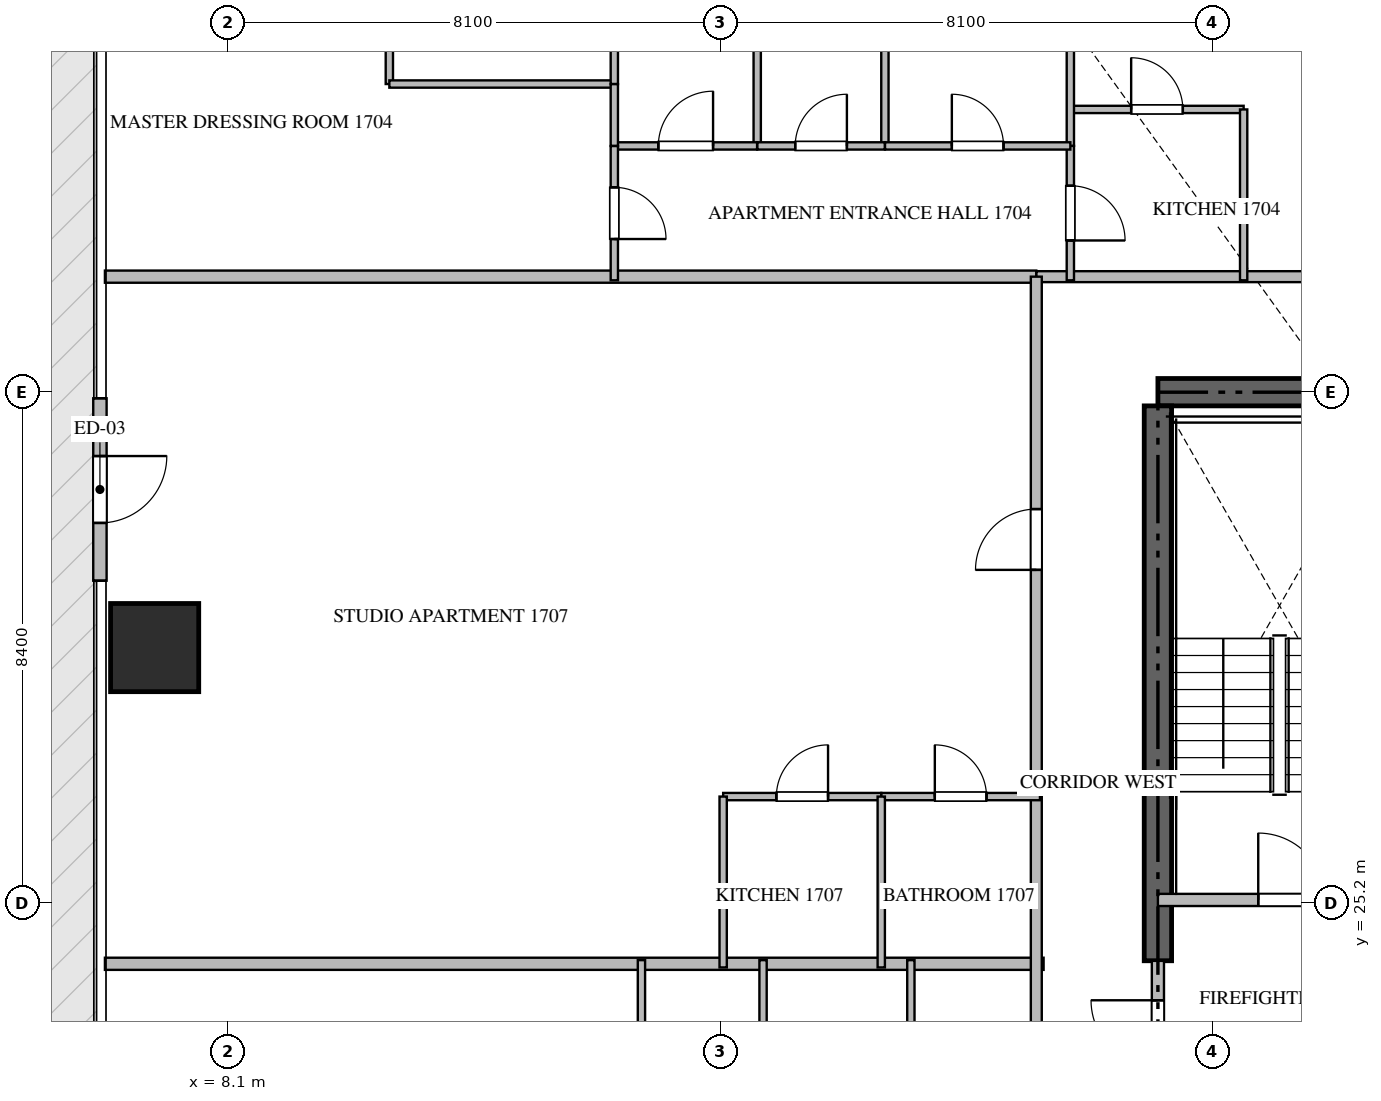
"""IFC4 building model, lengths in metres.
Left out: names, types, materials, properties, quantities, classifications, styles, units other than length and angle.
Written with IfcOpenShell. Run it as: python <this file> out.ifc"""

import sys

from ifc_helpers import new_model, si_unit, direction, frame, frame_2d, origin, origin_2d, place, context, subcontext, project, spatial, rectangle, extrude, source, transform, mapped, element, fill, save


model = new_model("IFC4")
c1 = context("Model", 3, precision=1e-05, world=origin(), true_north=direction((0.0, 1.0)))
c2 = subcontext(c1, "Body", "Model", "MODEL_VIEW")
j1 = project(units=[si_unit("LENGTHUNIT", "METRE"), si_unit("PLANEANGLEUNIT", "RADIAN")], contexts=[c1])
p1 = place(None, origin())
s1 = spatial("IfcSite", under=j1, at=p1, CompositionType="ELEMENT")
p2 = place(p1, origin())
s2 = spatial("IfcBuilding", under=s1, at=p2, CompositionType="ELEMENT")
p3 = place(p2, frame((0.0, 0.0, 71.7)))
s3 = spatial("IfcBuildingStorey", under=s2, at=p3, CompositionType="ELEMENT", Elevation=71.7)
p4 = place(p3, frame((41.4, 33.6, -0.26), z_axis=(0.0, 0.0, 1.0), x_axis=(-1.0, 0.0, 0.0)))
e1 = element("IfcWall", 1, at=p4, inside=s3, PredefinedType="SHEAR", context=c2, shape_type="SweptSolid", body=[
    extrude(rectangle(XDim=18.0, YDim=0.45, at=frame_2d((9.0, 0.0))), origin(), (0.0, 0.0, 1.0), 3.748),
])
p5 = place(p3, frame((23.4, 24.25, -0.26), z_axis=(0.0, 0.0, 1.0), x_axis=(0.0, 1.0, 0.0)))
e2 = element("IfcWall", 2, at=p5, inside=s3, PredefinedType="SHEAR", context=c2, shape_type="SweptSolid", body=[
    extrude(rectangle(XDim=9.125, YDim=0.45, at=frame_2d((4.562, 0.0))), origin(), (0.0, 0.0, 1.0), 3.748),
])
m1 = source(origin(), c2, "Body", "SweptSolid", [
    extrude(rectangle(XDim=1.45, YDim=1.45, at=origin_2d()), origin(), (0.0, 0.0, 1.0), 3.75),
])
p6 = place(p3, frame((6.9, 29.4, -0.26), z_axis=(0.0, 0.0, 1.0), x_axis=(1.0, 0.0, 0.0)))
e3 = element("IfcColumn", 3, at=p6, inside=s3, PredefinedType="COLUMN", context=c2, shape_type="MappedRepresentation", body=[
    mapped(m1, transform((0.0, 0.0, 0.0), scale=1.0)),
])
p7 = place(p3, frame((6.0, 33.5, 0.0), z_axis=(0.0, 0.0, 1.0), x_axis=(0.0, -1.0, 0.0)))
e4 = element("IfcWall", 4, at=p7, inside=s3, PredefinedType="ELEMENTEDWALL", context=c2, shape_type="SweptSolid", body=[
    extrude(rectangle(XDim=3.0, YDim=0.22, at=frame_2d((1.5, 0.0))), origin(), (0.0, 0.0, 1.0), 3.475),
])
p8 = place(p7, frame((0.95, 0.0, 0.0)))
e5 = element("IfcOpeningElement", 5, at=p8, cuts=e4, PredefinedType="OPENING", context=c2, shape_type="SweptSolid", body=[
    extrude(rectangle(XDim=1.1, YDim=2.2, at=frame_2d((0.55, 1.1))), frame((0.0, 0.12, 0.0), z_axis=(0.0, -1.0, 0.0), x_axis=(1.0, 0.0, 0.0)), (0.0, 0.0, 1.0), 0.24),
])
p9 = place(p3, frame((23.4, 25.25, 0.0), z_axis=(0.0, 0.0, 1.0), x_axis=(1.0, 0.0, 0.0)))
e6 = element("IfcWall", 6, at=p9, inside=s3, PredefinedType="STANDARD", context=c2, shape_type="SweptSolid", body=[
    extrude(rectangle(XDim=4.45, YDim=0.2, at=frame_2d((2.225, 0.0))), origin(), (0.0, 0.0, 1.0), 3.49),
])
p10 = place(p9, frame((1.65, 0.0, 0.0)))
e7 = element("IfcOpeningElement", 7, at=p10, cuts=e6, PredefinedType="OPENING", context=c2, shape_type="SweptSolid", body=[
    extrude(rectangle(XDim=1.1, YDim=2.15, at=frame_2d((0.55, 1.075))), frame((0.0, 0.11, 0.0), z_axis=(0.0, -1.0, 0.0), x_axis=(1.0, 0.0, 0.0)), (0.0, 0.0, 1.0), 0.22),
])
p11 = place(p3, frame((23.4, 21.852, 0.0), z_axis=(0.0, 0.0, 1.0), x_axis=(0.0, 1.0, 0.0)))
e8 = element("IfcWall", 8, at=p11, inside=s3, PredefinedType="STANDARD", context=c2, shape_type="SweptSolid", body=[
    extrude(rectangle(XDim=2.396, YDim=0.2, at=frame_2d((1.198, 0.0))), origin(), (0.0, 0.0, 1.0), 3.49),
])
p12 = place(p11, frame((0.648, 0.0, 0.0)))
e9 = element("IfcOpeningElement", 9, at=p12, cuts=e8, PredefinedType="OPENING", context=c2, shape_type="SweptSolid", body=[
    extrude(rectangle(XDim=1.1, YDim=2.15, at=frame_2d((0.55, 1.075))), frame((0.0, 0.11, 0.0), z_axis=(0.0, -1.0, 0.0), x_axis=(1.0, 0.0, 0.0)), (0.0, 0.0, 1.0), 0.22),
])
p13 = place(p3, frame((6.082, 24.2, 0.0), z_axis=(0.0, 0.0, 1.0), x_axis=(1.0, 0.0, 0.0)))
e10 = element("IfcWall", 10, at=p13, inside=s3, PredefinedType="PARTITIONING", context=c2, shape_type="SweptSolid", body=[
    extrude(rectangle(XDim=15.438, YDim=0.2, at=frame_2d((7.719, 0.0))), origin(), (0.0, 0.0, 1.0), 3.49),
])
p14 = place(p3, frame((6.082, 35.5, 0.0), z_axis=(0.0, 0.0, 1.0), x_axis=(1.0, 0.0, 0.0)))
e11 = element("IfcWall", 11, at=p14, inside=s3, PredefinedType="PARTITIONING", context=c2, shape_type="SweptSolid", body=[
    extrude(rectangle(XDim=15.318, YDim=0.2, at=frame_2d((7.659, 0.0))), origin(), (0.0, 0.0, 1.0), 3.49),
])
p15 = place(p3, frame((21.402, 35.5, 0.0), z_axis=(0.0, 0.0, 1.0), x_axis=(1.0, 0.0, 0.0)))
e12 = element("IfcWall", 12, at=p15, inside=s3, PredefinedType="PARTITIONING", context=c2, shape_type="SweptSolid", body=[
    extrude(rectangle(XDim=21.996, YDim=0.18, at=frame_2d((10.998, 0.0))), origin(), (0.0, 0.0, 1.0), 3.49),
])
p16 = place(p15, frame((5.774, 0.0, 0.0)))
e13 = element("IfcOpeningElement", 13, at=p16, cuts=e12, PredefinedType="OPENING", context=c2, shape_type="SweptSolid", body=[
    extrude(rectangle(XDim=1.0, YDim=2.15, at=frame_2d((0.5, 1.075))), frame((0.0, 0.1, 0.0), z_axis=(0.0, -1.0, 0.0), x_axis=(1.0, 0.0, 0.0)), (0.0, 0.0, 1.0), 0.2),
])
p17 = place(p15, frame((16.272, 0.0, 0.0)))
e14 = element("IfcOpeningElement", 14, at=p17, cuts=e12, PredefinedType="OPENING", context=c2, shape_type="SweptSolid", body=[
    extrude(rectangle(XDim=1.0, YDim=2.15, at=frame_2d((0.5, 1.075))), frame((0.0, 0.1, 0.0), z_axis=(0.0, -1.0, 0.0), x_axis=(1.0, 0.0, 0.0)), (0.0, 0.0, 1.0), 0.2),
])
p18 = place(p3, frame((21.4, 14.9, 0.0), z_axis=(0.0, 0.0, 1.0), x_axis=(0.0, 1.0, 0.0)))
e15 = element("IfcWall", 15, at=p18, inside=s3, PredefinedType="PARTITIONING", context=c2, shape_type="SweptSolid", body=[
    extrude(rectangle(XDim=20.6, YDim=0.18, at=frame_2d((10.3, 0.0))), origin(), (0.0, 0.0, 1.0), 3.49),
])
p19 = place(p18, frame((1.96, 0.0, 0.0)))
e16 = element("IfcOpeningElement", 16, at=p19, cuts=e15, PredefinedType="OPENING", context=c2, shape_type="SweptSolid", body=[
    extrude(rectangle(XDim=1.0, YDim=2.15, at=frame_2d((0.5, 1.075))), frame((0.0, 0.1, 0.0), z_axis=(0.0, -1.0, 0.0), x_axis=(1.0, 0.0, 0.0)), (0.0, 0.0, 1.0), 0.2),
])
p20 = place(p18, frame((15.778, 0.0, 0.0)))
e17 = element("IfcOpeningElement", 17, at=p20, cuts=e15, PredefinedType="OPENING", context=c2, shape_type="SweptSolid", body=[
    extrude(rectangle(XDim=1.0, YDim=2.15, at=frame_2d((0.5, 1.075))), frame((0.0, 0.1, 0.0), z_axis=(0.0, -1.0, 0.0), x_axis=(1.0, 0.0, 0.0)), (0.0, 0.0, 1.0), 0.2),
])
p21 = place(p3, frame((21.96, 38.25, 0.0), z_axis=(0.0, 0.0, 1.0), x_axis=(1.0, 0.0, 0.0)))
e18 = element("IfcWall", 18, at=p21, inside=s3, PredefinedType="PARTITIONING", context=c2, shape_type="SweptSolid", body=[
    extrude(rectangle(XDim=2.85, YDim=0.12, at=frame_2d((1.425, 0.0))), origin(), (0.0, 0.0, 1.0), 3.49),
])
p22 = place(p21, frame((1.0, 0.0, 0.0)))
e19 = element("IfcOpeningElement", 19, at=p22, cuts=e18, PredefinedType="OPENING", context=c2, shape_type="SweptSolid", body=[
    extrude(rectangle(XDim=0.85, YDim=2.1, at=frame_2d((0.425, 1.05))), frame((0.0, 0.07, 0.0), z_axis=(0.0, -1.0, 0.0), x_axis=(1.0, 0.0, 0.0)), (0.0, 0.0, 1.0), 0.14),
])
p23 = place(p3, frame((24.81, 38.25, 0.0), z_axis=(0.0, 0.0, 1.0), x_axis=(0.0, -1.0, 0.0)))
e20 = element("IfcWall", 20, at=p23, inside=s3, PredefinedType="PARTITIONING", context=c2, shape_type="SweptSolid", body=[
    extrude(rectangle(XDim=2.81, YDim=0.12, at=frame_2d((1.405, 0.0))), origin(), (0.0, 0.0, 1.0), 3.49),
])
p24 = place(p3, frame((21.96, 37.65, 0.0), z_axis=(0.0, 0.0, 1.0), x_axis=(0.0, -1.0, 0.0)))
e21 = element("IfcWall", 21, at=p24, inside=s3, PredefinedType="PARTITIONING", context=c2, shape_type="SweptSolid", body=[
    extrude(rectangle(XDim=2.21, YDim=0.12, at=frame_2d((1.105, 0.0))), origin(), (0.0, 0.0, 1.0), 3.49),
])
p25 = place(p24, frame((0.655, 0.0, 0.0)))
e22 = element("IfcOpeningElement", 22, at=p25, cuts=e21, PredefinedType="OPENING", context=c2, shape_type="SweptSolid", body=[
    extrude(rectangle(XDim=0.9, YDim=2.1, at=frame_2d((0.45, 1.05))), frame((0.0, 0.07, 0.0), z_axis=(0.0, -1.0, 0.0), x_axis=(1.0, 0.0, 0.0)), (0.0, 0.0, 1.0), 0.14),
])
p26 = place(p3, frame((21.96, 43.538, 0.0), z_axis=(0.0, 0.0, 1.0), x_axis=(0.0, -1.0, 0.0)))
e23 = element("IfcWall", 23, at=p26, inside=s3, PredefinedType="PARTITIONING", context=c2, shape_type="SweptSolid", body=[
    extrude(rectangle(XDim=5.886, YDim=0.12, at=frame_2d((2.943, 0.0))), origin(), (0.0, 0.0, 1.0), 3.49),
])
p27 = place(p3, frame((16.81, 50.105, 0.0), z_axis=(0.0, 0.0, 1.0), x_axis=(0.0, -1.0, 0.0)))
e24 = element("IfcWall", 24, at=p27, inside=s3, PredefinedType="PARTITIONING", context=c2, shape_type="SweptSolid", body=[
    extrude(rectangle(XDim=12.455, YDim=0.12, at=frame_2d((6.228, 0.0))), origin(), (0.0, 0.0, 1.0), 3.49),
])
p28 = place(p3, frame((18.91, 43.54, 0.0), z_axis=(0.0, 0.0, 1.0), x_axis=(0.0, -1.0, 0.0)))
e25 = element("IfcWall", 25, at=p28, inside=s3, PredefinedType="PARTITIONING", context=c2, shape_type="SweptSolid", body=[
    extrude(rectangle(XDim=5.89, YDim=0.12, at=frame_2d((2.945, 0.0))), origin(), (0.0, 0.0, 1.0), 3.49),
])
p29 = place(p3, frame((16.81, 37.65, 0.0), z_axis=(0.0, 0.0, 1.0), x_axis=(1.0, 0.0, 0.0)))
e26 = element("IfcWall", 26, at=p29, inside=s3, PredefinedType="PARTITIONING", context=c2, shape_type="SweptSolid", body=[
    extrude(rectangle(XDim=2.1, YDim=0.12, at=frame_2d((1.05, 0.0))), origin(), (0.0, 0.0, 1.0), 3.49),
])
p30 = place(p29, frame((0.625, 0.0, 0.0)))
e27 = element("IfcOpeningElement", 27, at=p30, cuts=e26, PredefinedType="OPENING", context=c2, shape_type="SweptSolid", body=[
    extrude(rectangle(XDim=0.85, YDim=2.1, at=frame_2d((0.425, 1.05))), frame((0.0, 0.07, 0.0), z_axis=(0.0, -1.0, 0.0), x_axis=(1.0, 0.0, 0.0)), (0.0, 0.0, 1.0), 0.14),
])
p31 = place(p3, frame((18.912, 37.65, 0.0), z_axis=(0.0, 0.0, 1.0), x_axis=(1.0, 0.0, 0.0)))
e28 = element("IfcWall", 28, at=p31, inside=s3, PredefinedType="PARTITIONING", context=c2, shape_type="SweptSolid", body=[
    extrude(rectangle(XDim=3.048, YDim=0.12, at=frame_2d((1.524, 0.0))), origin(), (0.0, 0.0, 1.0), 3.49),
])
p32 = place(p31, frame((1.099, 0.0, 0.0)))
e29 = element("IfcOpeningElement", 29, at=p32, cuts=e28, PredefinedType="OPENING", context=c2, shape_type="SweptSolid", body=[
    extrude(rectangle(XDim=0.85, YDim=2.1, at=frame_2d((0.425, 1.05))), frame((0.0, 0.07, 0.0), z_axis=(0.0, -1.0, 0.0), x_axis=(1.0, 0.0, 0.0)), (0.0, 0.0, 1.0), 0.14),
])
p33 = place(p3, frame((14.46, 37.65, 0.0), z_axis=(0.0, 0.0, 1.0), x_axis=(1.0, 0.0, 0.0)))
e30 = element("IfcWall", 30, at=p33, inside=s3, PredefinedType="PARTITIONING", context=c2, shape_type="SweptSolid", body=[
    extrude(rectangle(XDim=2.348, YDim=0.12, at=frame_2d((1.174, 0.0))), origin(), (0.0, 0.0, 1.0), 3.49),
])
p34 = place(p33, frame((0.724, 0.0, 0.0)))
e31 = element("IfcOpeningElement", 31, at=p34, cuts=e30, PredefinedType="OPENING", context=c2, shape_type="SweptSolid", body=[
    extrude(rectangle(XDim=0.9, YDim=2.1, at=frame_2d((0.45, 1.05))), frame((0.0, 0.07, 0.0), z_axis=(0.0, -1.0, 0.0), x_axis=(1.0, 0.0, 0.0)), (0.0, 0.0, 1.0), 0.14),
])
p35 = place(p3, frame((10.76, 45.905, 0.0), z_axis=(0.0, 0.0, 1.0), x_axis=(0.0, -1.0, 0.0)))
e32 = element("IfcWall", 32, at=p35, inside=s3, PredefinedType="PARTITIONING", context=c2, shape_type="SweptSolid", body=[
    extrude(rectangle(XDim=7.237, YDim=0.12, at=frame_2d((3.619, 0.0))), origin(), (0.0, 0.0, 1.0), 3.49),
])
p36 = place(p3, frame((10.76, 38.668, 0.0), z_axis=(0.0, 0.0, 1.0), x_axis=(1.0, 0.0, 0.0)))
e33 = element("IfcWall", 33, at=p36, inside=s3, PredefinedType="PARTITIONING", context=c2, shape_type="SweptSolid", body=[
    extrude(rectangle(XDim=3.7, YDim=0.12, at=frame_2d((1.85, 0.0))), origin(), (0.0, 0.0, 1.0), 3.49),
])
p37 = place(p3, frame((14.46, 42.452, 0.0), z_axis=(0.0, 0.0, 1.0), x_axis=(0.0, -1.0, 0.0)))
e34 = element("IfcWall", 34, at=p37, inside=s3, PredefinedType="PARTITIONING", context=c2, shape_type="SweptSolid", body=[
    extrude(rectangle(XDim=3.784, YDim=0.12, at=frame_2d((1.892, 0.0))), origin(), (0.0, 0.0, 1.0), 3.49),
])
p38 = place(p37, frame((1.467, 0.0, 0.0)))
e35 = element("IfcOpeningElement", 35, at=p38, cuts=e34, PredefinedType="OPENING", context=c2, shape_type="SweptSolid", body=[
    extrude(rectangle(XDim=0.85, YDim=2.1, at=frame_2d((0.425, 1.05))), frame((0.0, 0.07, 0.0), z_axis=(0.0, -1.0, 0.0), x_axis=(1.0, 0.0, 0.0)), (0.0, 0.0, 1.0), 0.14),
])
p39 = place(p3, frame((14.46, 38.666, 0.0), z_axis=(0.0, 0.0, 1.0), x_axis=(0.0, -1.0, 0.0)))
e36 = element("IfcWall", 36, at=p39, inside=s3, PredefinedType="PARTITIONING", context=c2, shape_type="SweptSolid", body=[
    extrude(rectangle(XDim=1.016, YDim=0.12, at=frame_2d((0.508, 0.0))), origin(), (0.0, 0.0, 1.0), 3.49),
])
p40 = place(p3, frame((14.46, 37.648, 0.0), z_axis=(0.0, 0.0, 1.0), x_axis=(0.0, -1.0, 0.0)))
e37 = element("IfcWall", 37, at=p40, inside=s3, PredefinedType="PARTITIONING", context=c2, shape_type="SweptSolid", body=[
    extrude(rectangle(XDim=2.208, YDim=0.12, at=frame_2d((1.104, 0.0))), origin(), (0.0, 0.0, 1.0), 3.49),
])
p41 = place(p40, frame((0.679, 0.0, 0.0)))
e38 = element("IfcOpeningElement", 38, at=p41, cuts=e37, PredefinedType="OPENING", context=c2, shape_type="SweptSolid", body=[
    extrude(rectangle(XDim=0.85, YDim=2.1, at=frame_2d((0.425, 1.05))), frame((0.0, 0.07, 0.0), z_axis=(0.0, -1.0, 0.0), x_axis=(1.0, 0.0, 0.0)), (0.0, 0.0, 1.0), 0.14),
])
for number, where, z_axis, x_axis in (
    (39, (14.906, 19.4, 0.0), (0.0, 0.0, 1.0), (0.0, 1.0, 0.0)),
    (40, (16.906, 19.4, 0.0), (0.0, 0.0, 1.0), (0.0, 1.0, 0.0)),
    (41, (19.337, 19.4, 0.0), (0.0, 0.0, 1.0), (0.0, 1.0, 0.0)),
):
    element("IfcWall", number, at=place(p3, frame(where, z_axis=z_axis, x_axis=x_axis)), inside=s3, PredefinedType="PARTITIONING", context=c2, shape_type="SweptSolid", body=[
        extrude(rectangle(XDim=4.86, YDim=0.12, at=frame_2d((2.43, 0.0))), origin(), (0.0, 0.0, 1.0), 3.49),
    ])
p42 = place(p3, frame((16.25, 26.95, 0.0), z_axis=(0.0, 0.0, 1.0), x_axis=(1.0, 0.0, 0.0)))
e42 = element("IfcWall", 42, at=p42, inside=s3, PredefinedType="PARTITIONING", context=c2, shape_type="SweptSolid", body=[
    extrude(rectangle(XDim=2.6, YDim=0.12, at=frame_2d((1.3, 0.0))), origin(), (0.0, 0.0, 1.0), 3.49),
])
p43 = place(p42, frame((0.875, 0.0, 0.0)))
e43 = element("IfcOpeningElement", 43, at=p43, cuts=e42, PredefinedType="OPENING", context=c2, shape_type="SweptSolid", body=[
    extrude(rectangle(XDim=0.85, YDim=2.1, at=frame_2d((0.425, 1.05))), frame((0.0, 0.07, 0.0), z_axis=(0.0, -1.0, 0.0), x_axis=(1.0, 0.0, 0.0)), (0.0, 0.0, 1.0), 0.14),
])
p44 = place(p3, frame((18.852, 26.95, 0.0), z_axis=(0.0, 0.0, 1.0), x_axis=(1.0, 0.0, 0.0)))
e44 = element("IfcWall", 44, at=p44, inside=s3, PredefinedType="PARTITIONING", context=c2, shape_type="SweptSolid", body=[
    extrude(rectangle(XDim=2.608, YDim=0.12, at=frame_2d((1.304, 0.0))), origin(), (0.0, 0.0, 1.0), 3.49),
])
p45 = place(p44, frame((0.879, 0.0, 0.0)))
e45 = element("IfcOpeningElement", 45, at=p45, cuts=e44, PredefinedType="OPENING", context=c2, shape_type="SweptSolid", body=[
    extrude(rectangle(XDim=0.85, YDim=2.1, at=frame_2d((0.425, 1.05))), frame((0.0, 0.07, 0.0), z_axis=(0.0, -1.0, 0.0), x_axis=(1.0, 0.0, 0.0)), (0.0, 0.0, 1.0), 0.14),
])
for number, where, z_axis, x_axis in (
    (46, (18.85, 24.14, 0.0), (0.0, 0.0, 1.0), (0.0, 1.0, 0.0)),
    (47, (16.25, 24.14, 0.0), (0.0, 0.0, 1.0), (0.0, 1.0, 0.0)),
):
    element("IfcWall", number, at=place(p3, frame(where, z_axis=z_axis, x_axis=x_axis)), inside=s3, PredefinedType="PARTITIONING", context=c2, shape_type="SweptSolid", body=[
        extrude(rectangle(XDim=2.81, YDim=0.12, at=frame_2d((1.405, 0.0))), origin(), (0.0, 0.0, 1.0), 3.49),
    ])
m2 = source(origin(), c2, "Body", "SweptSolid", [
    extrude(rectangle(XDim=1.1, YDim=2.2, at=frame_2d((0.55, 1.1))), frame((0.0, 0.025, 0.0), z_axis=(0.0, -1.0, 0.0), x_axis=(1.0, 0.0, 0.0)), (0.0, 0.0, 1.0), 0.05),
])
p46 = place(p8, origin())
e48 = element("IfcDoor", 48, at=p46, inside=s3, OperationType="SINGLE_SWING_LEFT", PredefinedType="DOOR", context=c2, shape_type="MappedRepresentation", body=[
    mapped(m2, transform((0.0, 0.0, 0.0), scale=1.0)),
])
fill(e5, e48)
m3 = source(origin(), c2, "Body", "SweptSolid", [
    extrude(rectangle(XDim=1.1, YDim=2.15, at=frame_2d((0.55, 1.075))), frame((0.0, 0.025, 0.0), z_axis=(0.0, -1.0, 0.0), x_axis=(1.0, 0.0, 0.0)), (0.0, 0.0, 1.0), 0.05),
])
p47 = place(p10, origin())
e49 = element("IfcDoor", 49, at=p47, inside=s3, OperationType="SINGLE_SWING_LEFT", PredefinedType="DOOR", context=c2, shape_type="MappedRepresentation", body=[
    mapped(m3, transform((0.0, 0.0, 0.0), scale=1.0)),
])
fill(e7, e49)
p48 = place(p12, origin())
e50 = element("IfcDoor", 50, at=p48, inside=s3, OperationType="SINGLE_SWING_RIGHT", PredefinedType="DOOR", context=c2, shape_type="MappedRepresentation", body=[
    mapped(m3, transform((0.0, 0.0, 0.0), scale=1.0)),
])
fill(e9, e50)
m4 = source(origin(), c2, "Body", "SweptSolid", [
    extrude(rectangle(XDim=1.0, YDim=2.15, at=frame_2d((0.5, 1.075))), frame((0.0, 0.025, 0.0), z_axis=(0.0, -1.0, 0.0), x_axis=(1.0, 0.0, 0.0)), (0.0, 0.0, 1.0), 0.05),
])
p49 = place(p20, origin())
e51 = element("IfcDoor", 51, at=p49, inside=s3, OperationType="SINGLE_SWING_LEFT", PredefinedType="DOOR", context=c2, shape_type="MappedRepresentation", body=[
    mapped(m4, transform((0.0, 0.0, 0.0), scale=1.0)),
])
fill(e17, e51)
m5 = source(origin(), c2, "Body", "SweptSolid", [
    extrude(rectangle(XDim=0.85, YDim=2.1, at=frame_2d((0.425, 1.05))), frame((0.0, 0.025, 0.0), z_axis=(0.0, -1.0, 0.0), x_axis=(1.0, 0.0, 0.0)), (0.0, 0.0, 1.0), 0.05),
])
p50 = place(p22, origin())
e52 = element("IfcDoor", 52, at=p50, inside=s3, OperationType="SINGLE_SWING_LEFT", PredefinedType="DOOR", context=c2, shape_type="MappedRepresentation", body=[
    mapped(m5, transform((0.0, 0.0, 0.0), scale=1.0)),
])
fill(e19, e52)
m6 = source(origin(), c2, "Body", "SweptSolid", [
    extrude(rectangle(XDim=0.9, YDim=2.1, at=frame_2d((0.45, 1.05))), frame((0.0, 0.025, 0.0), z_axis=(0.0, -1.0, 0.0), x_axis=(1.0, 0.0, 0.0)), (0.0, 0.0, 1.0), 0.05),
])
p51 = place(p25, origin())
e53 = element("IfcDoor", 53, at=p51, inside=s3, OperationType="SINGLE_SWING_RIGHT", PredefinedType="DOOR", context=c2, shape_type="MappedRepresentation", body=[
    mapped(m6, transform((0.0, 0.0, 0.0), scale=1.0)),
])
fill(e22, e53)
p52 = place(p30, origin())
e54 = element("IfcDoor", 54, at=p52, inside=s3, OperationType="SINGLE_SWING_RIGHT", PredefinedType="DOOR", context=c2, shape_type="MappedRepresentation", body=[
    mapped(m5, transform((0.0, 0.0, 0.0), scale=1.0)),
])
fill(e27, e54)
p53 = place(p32, origin())
e55 = element("IfcDoor", 55, at=p53, inside=s3, OperationType="SINGLE_SWING_LEFT", PredefinedType="DOOR", context=c2, shape_type="MappedRepresentation", body=[
    mapped(m5, transform((0.0, 0.0, 0.0), scale=1.0)),
])
fill(e29, e55)
p54 = place(p34, origin())
e56 = element("IfcDoor", 56, at=p54, inside=s3, OperationType="SINGLE_SWING_RIGHT", PredefinedType="DOOR", context=c2, shape_type="MappedRepresentation", body=[
    mapped(m6, transform((0.0, 0.0, 0.0), scale=1.0)),
])
fill(e31, e56)
p55 = place(p41, origin())
e57 = element("IfcDoor", 57, at=p55, inside=s3, OperationType="SINGLE_SWING_RIGHT", PredefinedType="DOOR", context=c2, shape_type="MappedRepresentation", body=[
    mapped(m5, transform((0.0, 0.0, 0.0), scale=1.0)),
])
fill(e38, e57)
p56 = place(p43, origin())
e58 = element("IfcDoor", 58, at=p56, inside=s3, OperationType="SINGLE_SWING_RIGHT", PredefinedType="DOOR", context=c2, shape_type="MappedRepresentation", body=[
    mapped(m5, transform((0.0, 0.0, 0.0), scale=1.0)),
])
fill(e43, e58)
p57 = place(p45, origin())
e59 = element("IfcDoor", 59, at=p57, inside=s3, OperationType="SINGLE_SWING_LEFT", PredefinedType="DOOR", context=c2, shape_type="MappedRepresentation", body=[
    mapped(m5, transform((0.0, 0.0, 0.0), scale=1.0)),
])
fill(e45, e59)
save(model, sys.argv[1])
